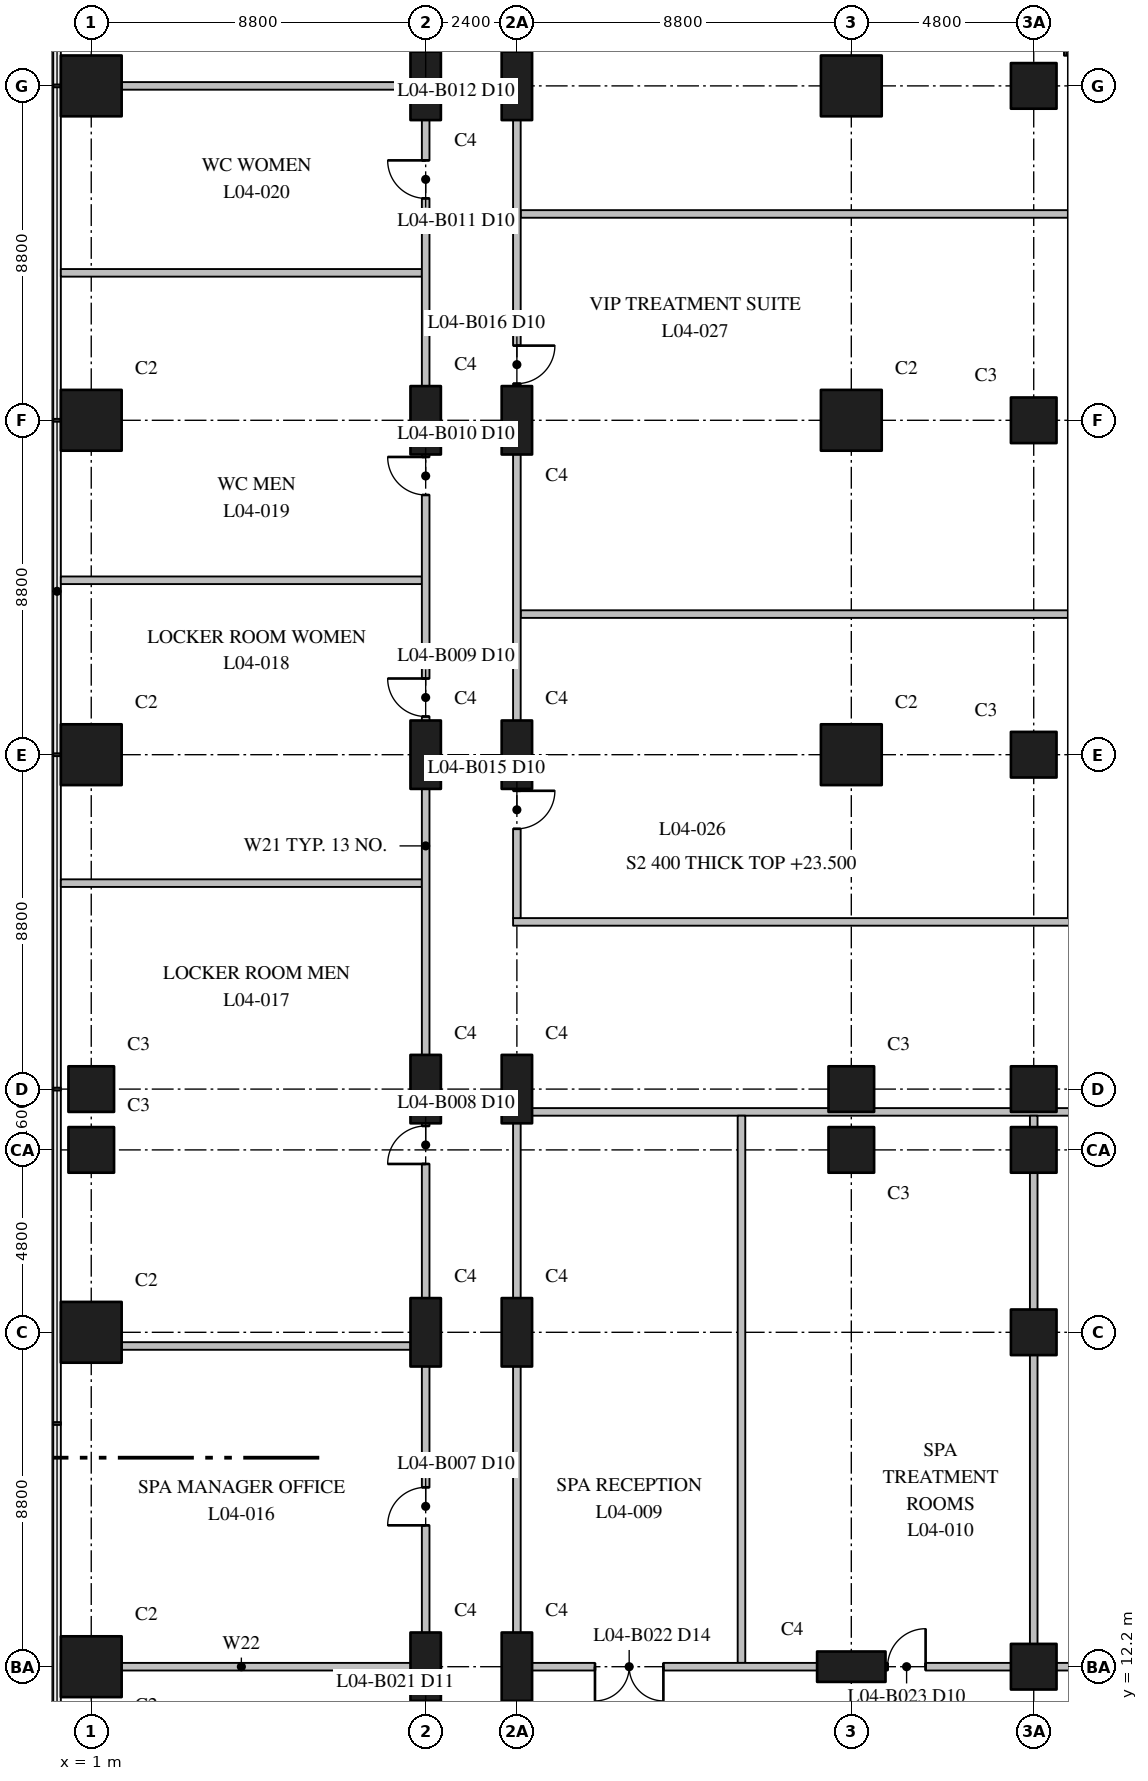
"""IFC4 building model, lengths in metres.
Left out: names, types, materials, properties, quantities, classifications, styles, units other than length and angle.
Written with IfcOpenShell. Run it as: python <this file> out.ifc"""

import sys

from ifc_helpers import new_model, si_unit, direction, frame, frame_2d, origin, origin_2d, place, context, subcontext, project, spatial, rectangle, extrude, element, fill, save


model = new_model("IFC4")
c1 = context("Model", 3, precision=1e-05, world=origin(), true_north=direction((0.0, 1.0)))
c2 = subcontext(c1, "Body", "Model", "MODEL_VIEW")
j1 = project(units=[si_unit("LENGTHUNIT", "METRE"), si_unit("PLANEANGLEUNIT", "RADIAN")], contexts=[c1])
p1 = place(None, origin())
s1 = spatial("IfcSite", under=j1, at=p1, CompositionType="ELEMENT")
p2 = place(p1, origin())
s2 = spatial("IfcBuilding", under=s1, at=p2, CompositionType="ELEMENT")
p3 = place(p2, frame((0.0, 0.0, 23.5)))
s3 = spatial("IfcBuildingStorey", under=s2, at=p3, CompositionType="ELEMENT", Elevation=23.5)
for number, where, z_axis, x_axis in (
    (1, (1.0, 12.2, 0.0), (0.0, 0.0, 1.0), (1.0, 0.0, 0.0)),
    (2, (1.0, 21.0, 0.0), (0.0, 0.0, 1.0), (1.0, 0.0, 0.0)),
):
    element("IfcColumn", number, at=place(p3, frame(where, z_axis=z_axis, x_axis=x_axis)), inside=s3, PredefinedType="COLUMN", context=c2, shape_type="SweptSolid", body=[
        extrude(rectangle(XDim=1.6, YDim=1.6, at=origin_2d()), origin(), (0.0, 0.0, 1.0), 5.5),
    ])
for number, where, z_axis, x_axis in (
    (3, (1.0, 25.8, 0.0), (0.0, 0.0, 1.0), (1.0, 0.0, 0.0)),
    (4, (1.0, 27.4, 0.0), (0.0, 0.0, 1.0), (1.0, 0.0, 0.0)),
):
    element("IfcColumn", number, at=place(p3, frame(where, z_axis=z_axis, x_axis=x_axis)), inside=s3, PredefinedType="COLUMN", context=c2, shape_type="SweptSolid", body=[
        extrude(rectangle(XDim=1.2, YDim=1.2, at=origin_2d()), origin(), (0.0, 0.0, 1.0), 5.5),
    ])
for number, where, z_axis, x_axis in (
    (5, (1.0, 36.2, 0.0), (0.0, 0.0, 1.0), (1.0, 0.0, 0.0)),
    (6, (1.0, 45.0, 0.0), (0.0, 0.0, 1.0), (1.0, 0.0, 0.0)),
    (7, (1.0, 53.8, 0.0), (0.0, 0.0, 1.0), (1.0, 0.0, 0.0)),
):
    element("IfcColumn", number, at=place(p3, frame(where, z_axis=z_axis, x_axis=x_axis)), inside=s3, PredefinedType="COLUMN", context=c2, shape_type="SweptSolid", body=[
        extrude(rectangle(XDim=1.6, YDim=1.6, at=origin_2d()), origin(), (0.0, 0.0, 1.0), 5.5),
    ])
for number, where, z_axis, x_axis in (
    (8, (9.8, 12.2, 0.0), (0.0, 0.0, 1.0), (0.0, 1.0, 0.0)),
    (9, (9.8, 21.0, 0.0), (0.0, 0.0, 1.0), (0.0, 1.0, 0.0)),
    (10, (9.8, 27.4, 0.0), (0.0, 0.0, 1.0), (0.0, 1.0, 0.0)),
    (11, (9.8, 36.2, 0.0), (0.0, 0.0, 1.0), (0.0, 1.0, 0.0)),
    (12, (9.8, 45.0, 0.0), (0.0, 0.0, 1.0), (0.0, 1.0, 0.0)),
    (13, (9.8, 53.8, 0.0), (0.0, 0.0, 1.0), (0.0, 1.0, 0.0)),
    (14, (12.2, 12.2, 0.0), (0.0, 0.0, 1.0), (0.0, 1.0, 0.0)),
    (15, (12.2, 21.0, 0.0), (0.0, 0.0, 1.0), (0.0, 1.0, 0.0)),
    (16, (12.2, 27.4, 0.0), (0.0, 0.0, 1.0), (0.0, 1.0, 0.0)),
    (17, (12.2, 36.2, 0.0), (0.0, 0.0, 1.0), (0.0, 1.0, 0.0)),
    (18, (12.2, 45.0, 0.0), (0.0, 0.0, 1.0), (0.0, 1.0, 0.0)),
    (19, (12.2, 53.8, 0.0), (0.0, 0.0, 1.0), (0.0, 1.0, 0.0)),
    (20, (21.0, 12.2, 0.0), (0.0, 0.0, 1.0), (1.0, 0.0, 0.0)),
):
    element("IfcColumn", number, at=place(p3, frame(where, z_axis=z_axis, x_axis=x_axis)), inside=s3, PredefinedType="COLUMN", context=c2, shape_type="SweptSolid", body=[
        extrude(rectangle(XDim=1.8, YDim=0.8, at=origin_2d()), origin(), (0.0, 0.0, 1.0), 5.5),
    ])
for number, where, z_axis, x_axis in (
    (21, (21.0, 25.8, 0.0), (0.0, 0.0, 1.0), (1.0, 0.0, 0.0)),
    (22, (21.0, 27.4, 0.0), (0.0, 0.0, 1.0), (1.0, 0.0, 0.0)),
):
    element("IfcColumn", number, at=place(p3, frame(where, z_axis=z_axis, x_axis=x_axis)), inside=s3, PredefinedType="COLUMN", context=c2, shape_type="SweptSolid", body=[
        extrude(rectangle(XDim=1.2, YDim=1.2, at=origin_2d()), origin(), (0.0, 0.0, 1.0), 5.5),
    ])
for number, where, z_axis, x_axis in (
    (23, (21.0, 36.2, 0.0), (0.0, 0.0, 1.0), (1.0, 0.0, 0.0)),
    (24, (21.0, 45.0, 0.0), (0.0, 0.0, 1.0), (1.0, 0.0, 0.0)),
    (25, (21.0, 53.8, 0.0), (0.0, 0.0, 1.0), (1.0, 0.0, 0.0)),
):
    element("IfcColumn", number, at=place(p3, frame(where, z_axis=z_axis, x_axis=x_axis)), inside=s3, PredefinedType="COLUMN", context=c2, shape_type="SweptSolid", body=[
        extrude(rectangle(XDim=1.6, YDim=1.6, at=origin_2d()), origin(), (0.0, 0.0, 1.0), 5.5),
    ])
for number, where, z_axis, x_axis in (
    (26, (25.8, 12.2, 0.0), (0.0, 0.0, 1.0), (1.0, 0.0, 0.0)),
    (27, (25.8, 21.0, 0.0), (0.0, 0.0, 1.0), (1.0, 0.0, 0.0)),
    (28, (25.8, 25.8, 0.0), (0.0, 0.0, 1.0), (1.0, 0.0, 0.0)),
    (29, (25.8, 27.4, 0.0), (0.0, 0.0, 1.0), (1.0, 0.0, 0.0)),
    (30, (25.8, 36.2, 0.0), (0.0, 0.0, 1.0), (1.0, 0.0, 0.0)),
    (31, (25.8, 45.0, 0.0), (0.0, 0.0, 1.0), (1.0, 0.0, 0.0)),
    (32, (25.8, 53.8, 0.0), (0.0, 0.0, 1.0), (1.0, 0.0, 0.0)),
):
    element("IfcColumn", number, at=place(p3, frame(where, z_axis=z_axis, x_axis=x_axis)), inside=s3, PredefinedType="COLUMN", context=c2, shape_type="SweptSolid", body=[
        extrude(rectangle(XDim=1.2, YDim=1.2, at=origin_2d()), origin(), (0.0, 0.0, 1.0), 5.5),
    ])
p4 = place(p3, frame((0.2, 12.2, 0.0), z_axis=(0.0, 0.0, 1.0), x_axis=(1.0, 0.0, 0.0)))
e33 = element("IfcWall", 33, at=p4, inside=s3, PredefinedType="PARTITIONING", context=c2, shape_type="SweptSolid", body=[
    extrude(rectangle(XDim=9.5, YDim=0.2, at=frame_2d((4.75, 0.0))), origin(), (0.0, 0.0, 1.0), 5.1),
])
p5 = place(p3, frame((12.1, 12.2, 0.0), z_axis=(0.0, 0.0, 1.0), x_axis=(1.0, 0.0, 0.0)))
e34 = element("IfcWall", 34, at=p5, inside=s3, PredefinedType="PARTITIONING", context=c2, shape_type="SweptSolid", body=[
    extrude(rectangle(XDim=18.9, YDim=0.2, at=frame_2d((9.45, 0.0))), origin(), (0.0, 0.0, 1.0), 5.1),
])
p6 = place(p5, frame((2.155, 0.0, 0.0)))
e35 = element("IfcOpeningElement", 35, at=p6, cuts=e34, PredefinedType="OPENING", context=c2, shape_type="SweptSolid", body=[
    extrude(rectangle(XDim=1.8, YDim=2.4, at=frame_2d((0.9, 1.2))), frame((0.0, 0.11, 0.0), z_axis=(0.0, -1.0, 0.0), x_axis=(1.0, 0.0, 0.0)), (0.0, 0.0, 1.0), 0.22),
])
p7 = place(p5, frame((9.855, 0.0, 0.0)))
e36 = element("IfcOpeningElement", 36, at=p7, cuts=e34, PredefinedType="OPENING", context=c2, shape_type="SweptSolid", body=[
    extrude(rectangle(XDim=1.0, YDim=2.1, at=frame_2d((0.5, 1.05))), frame((0.0, 0.11, 0.0), z_axis=(0.0, -1.0, 0.0), x_axis=(1.0, 0.0, 0.0)), (0.0, 0.0, 1.0), 0.22),
])
p8 = place(p3, frame((12.1, 26.8, 0.0), z_axis=(0.0, 0.0, 1.0), x_axis=(1.0, 0.0, 0.0)))
e37 = element("IfcWall", 37, at=p8, inside=s3, PredefinedType="PARTITIONING", context=c2, shape_type="SweptSolid", body=[
    extrude(rectangle(XDim=51.3, YDim=0.2, at=frame_2d((25.65, 0.0))), origin(), (0.0, 0.0, 1.0), 5.1),
])
p9 = place(p8, frame((18.4, 0.0, 0.0)))
e38 = element("IfcOpeningElement", 38, at=p9, cuts=e37, PredefinedType="OPENING", context=c2, shape_type="SweptSolid", body=[
    extrude(rectangle(XDim=1.0, YDim=2.1, at=frame_2d((0.5, 1.05))), frame((0.0, 0.11, 0.0), z_axis=(0.0, -1.0, 0.0), x_axis=(1.0, 0.0, 0.0)), (0.0, 0.0, 1.0), 0.22),
])
p10 = place(p8, frame((45.2, 0.0, 0.0)))
e39 = element("IfcOpeningElement", 39, at=p10, cuts=e37, PredefinedType="OPENING", context=c2, shape_type="SweptSolid", body=[
    extrude(rectangle(XDim=1.8, YDim=2.4, at=frame_2d((0.9, 1.2))), frame((0.0, 0.11, 0.0), z_axis=(0.0, -1.0, 0.0), x_axis=(1.0, 0.0, 0.0)), (0.0, 0.0, 1.0), 0.22),
])
p11 = place(p3, frame((12.1, 31.8, 0.0), z_axis=(0.0, 0.0, 1.0), x_axis=(1.0, 0.0, 0.0)))
e40 = element("IfcWall", 40, at=p11, inside=s3, PredefinedType="PARTITIONING", context=c2, shape_type="SweptSolid", body=[
    extrude(rectangle(XDim=20.2, YDim=0.2, at=frame_2d((10.1, 0.0))), origin(), (0.0, 0.0, 1.0), 5.1),
])
for number, where, z_axis, x_axis in (
    (41, (0.2, 20.64, 0.0), (0.0, 0.0, 1.0), (1.0, 0.0, 0.0)),
    (42, (0.2, 32.82, 0.0), (0.0, 0.0, 1.0), (1.0, 0.0, 0.0)),
    (43, (0.2, 40.79, 0.0), (0.0, 0.0, 1.0), (1.0, 0.0, 0.0)),
    (44, (0.2, 48.88, 0.0), (0.0, 0.0, 1.0), (1.0, 0.0, 0.0)),
    (45, (0.2, 53.8, 0.0), (0.0, 0.0, 1.0), (1.0, 0.0, 0.0)),
):
    element("IfcWall", number, at=place(p3, frame(where, z_axis=z_axis, x_axis=x_axis)), inside=s3, PredefinedType="PARTITIONING", context=c2, shape_type="SweptSolid", body=[
        extrude(rectangle(XDim=9.5, YDim=0.2, at=frame_2d((4.75, 0.0))), origin(), (0.0, 0.0, 1.0), 5.1),
    ])
for number, where, z_axis, x_axis in (
    (46, (12.3, 39.9, 0.0), (0.0, 0.0, 1.0), (1.0, 0.0, 0.0)),
    (47, (12.3, 50.43, 0.0), (0.0, 0.0, 1.0), (1.0, 0.0, 0.0)),
):
    element("IfcWall", number, at=place(p3, frame(where, z_axis=z_axis, x_axis=x_axis)), inside=s3, PredefinedType="PARTITIONING", context=c2, shape_type="SweptSolid", body=[
        extrude(rectangle(XDim=14.4, YDim=0.2, at=frame_2d((7.2, 0.0))), origin(), (0.0, 0.0, 1.0), 5.1),
    ])
p12 = place(p3, frame((9.8, 9.8, 0.0), z_axis=(0.0, 0.0, 1.0), x_axis=(0.0, 1.0, 0.0)))
e48 = element("IfcWall", 48, at=p12, inside=s3, PredefinedType="PARTITIONING", context=c2, shape_type="SweptSolid", body=[
    extrude(rectangle(XDim=48.0, YDim=0.2, at=frame_2d((24.0, 0.0))), origin(), (0.0, 0.0, 1.0), 5.1),
])
p13 = place(p12, frame((6.12, 0.0, 0.0)))
e49 = element("IfcOpeningElement", 49, at=p13, cuts=e48, PredefinedType="OPENING", context=c2, shape_type="SweptSolid", body=[
    extrude(rectangle(XDim=1.0, YDim=2.1, at=frame_2d((0.5, 1.05))), frame((0.0, 0.11, 0.0), z_axis=(0.0, -1.0, 0.0), x_axis=(1.0, 0.0, 0.0)), (0.0, 0.0, 1.0), 0.22),
])
p14 = place(p12, frame((15.63, 0.0, 0.0)))
e50 = element("IfcOpeningElement", 50, at=p14, cuts=e48, PredefinedType="OPENING", context=c2, shape_type="SweptSolid", body=[
    extrude(rectangle(XDim=1.0, YDim=2.1, at=frame_2d((0.5, 1.05))), frame((0.0, 0.11, 0.0), z_axis=(0.0, -1.0, 0.0), x_axis=(1.0, 0.0, 0.0)), (0.0, 0.0, 1.0), 0.22),
])
p15 = place(p12, frame((27.405, 0.0, 0.0)))
e51 = element("IfcOpeningElement", 51, at=p15, cuts=e48, PredefinedType="OPENING", context=c2, shape_type="SweptSolid", body=[
    extrude(rectangle(XDim=1.0, YDim=2.1, at=frame_2d((0.5, 1.05))), frame((0.0, 0.11, 0.0), z_axis=(0.0, -1.0, 0.0), x_axis=(1.0, 0.0, 0.0)), (0.0, 0.0, 1.0), 0.22),
])
p16 = place(p12, frame((33.235, 0.0, 0.0)))
e52 = element("IfcOpeningElement", 52, at=p16, cuts=e48, PredefinedType="OPENING", context=c2, shape_type="SweptSolid", body=[
    extrude(rectangle(XDim=1.0, YDim=2.1, at=frame_2d((0.5, 1.05))), frame((0.0, 0.11, 0.0), z_axis=(0.0, -1.0, 0.0), x_axis=(1.0, 0.0, 0.0)), (0.0, 0.0, 1.0), 0.22),
])
p17 = place(p12, frame((41.04, 0.0, 0.0)))
e53 = element("IfcOpeningElement", 53, at=p17, cuts=e48, PredefinedType="OPENING", context=c2, shape_type="SweptSolid", body=[
    extrude(rectangle(XDim=1.0, YDim=2.1, at=frame_2d((0.5, 1.05))), frame((0.0, 0.11, 0.0), z_axis=(0.0, -1.0, 0.0), x_axis=(1.0, 0.0, 0.0)), (0.0, 0.0, 1.0), 0.22),
])
p18 = place(p12, frame((44.967, 0.0, 0.0)))
e54 = element("IfcOpeningElement", 54, at=p18, cuts=e48, PredefinedType="OPENING", context=c2, shape_type="SweptSolid", body=[
    extrude(rectangle(XDim=1.0, YDim=2.1, at=frame_2d((0.5, 1.05))), frame((0.0, 0.11, 0.0), z_axis=(0.0, -1.0, 0.0), x_axis=(1.0, 0.0, 0.0)), (0.0, 0.0, 1.0), 0.22),
])
p19 = place(p12, frame((0.4, 0.0, 0.0)))
e55 = element("IfcOpeningElement", 55, at=p19, cuts=e48, PredefinedType="OPENING", context=c2, shape_type="SweptSolid", body=[
    extrude(rectangle(XDim=1.0, YDim=2.1, at=frame_2d((0.5, 1.05))), frame((0.0, 0.11, 0.0), z_axis=(0.0, -1.0, 0.0), x_axis=(1.0, 0.0, 0.0)), (0.0, 0.0, 1.0), 0.22),
])
p20 = place(p3, frame((12.2, 12.3, 0.0), z_axis=(0.0, 0.0, 1.0), x_axis=(0.0, 1.0, 0.0)))
e56 = element("IfcWall", 56, at=p20, inside=s3, PredefinedType="PARTITIONING", context=c2, shape_type="SweptSolid", body=[
    extrude(rectangle(XDim=14.4, YDim=0.2, at=frame_2d((7.2, 0.0))), origin(), (0.0, 0.0, 1.0), 5.1),
])
p21 = place(p3, frame((12.2, 31.9, 0.0), z_axis=(0.0, 0.0, 1.0), x_axis=(0.0, 1.0, 0.0)))
e57 = element("IfcWall", 57, at=p21, inside=s3, PredefinedType="PARTITIONING", context=c2, shape_type="SweptSolid", body=[
    extrude(rectangle(XDim=46.3, YDim=0.2, at=frame_2d((23.15, 0.0))), origin(), (0.0, 0.0, 1.0), 5.1),
])
p22 = place(p21, frame((2.35, 0.0, 0.0)))
e58 = element("IfcOpeningElement", 58, at=p22, cuts=e57, PredefinedType="OPENING", context=c2, shape_type="SweptSolid", body=[
    extrude(rectangle(XDim=1.0, YDim=2.1, at=frame_2d((0.5, 1.05))), frame((0.0, 0.11, 0.0), z_axis=(0.0, -1.0, 0.0), x_axis=(1.0, 0.0, 0.0)), (0.0, 0.0, 1.0), 0.22),
])
p23 = place(p21, frame((14.065, 0.0, 0.0)))
e59 = element("IfcOpeningElement", 59, at=p23, cuts=e57, PredefinedType="OPENING", context=c2, shape_type="SweptSolid", body=[
    extrude(rectangle(XDim=1.0, YDim=2.1, at=frame_2d((0.5, 1.05))), frame((0.0, 0.11, 0.0), z_axis=(0.0, -1.0, 0.0), x_axis=(1.0, 0.0, 0.0)), (0.0, 0.0, 1.0), 0.22),
])
p24 = place(p21, frame((22.84, 0.0, 0.0)))
e60 = element("IfcOpeningElement", 60, at=p24, cuts=e57, PredefinedType="OPENING", context=c2, shape_type="SweptSolid", body=[
    extrude(rectangle(XDim=1.8, YDim=2.4, at=frame_2d((0.9, 1.2))), frame((0.0, 0.11, 0.0), z_axis=(0.0, -1.0, 0.0), x_axis=(1.0, 0.0, 0.0)), (0.0, 0.0, 1.0), 0.22),
])
p25 = place(p21, frame((27.94, 0.0, 0.0)))
e61 = element("IfcOpeningElement", 61, at=p25, cuts=e57, PredefinedType="OPENING", context=c2, shape_type="SweptSolid", body=[
    extrude(rectangle(XDim=1.8, YDim=2.4, at=frame_2d((0.9, 1.2))), frame((0.0, 0.11, 0.0), z_axis=(0.0, -1.0, 0.0), x_axis=(1.0, 0.0, 0.0)), (0.0, 0.0, 1.0), 0.22),
])
p26 = place(p21, frame((37.565, 0.0, 0.0)))
e62 = element("IfcOpeningElement", 62, at=p26, cuts=e57, PredefinedType="OPENING", context=c2, shape_type="SweptSolid", body=[
    extrude(rectangle(XDim=1.0, YDim=2.1, at=frame_2d((0.5, 1.05))), frame((0.0, 0.11, 0.0), z_axis=(0.0, -1.0, 0.0), x_axis=(1.0, 0.0, 0.0)), (0.0, 0.0, 1.0), 0.22),
])
p27 = place(p21, frame((42.85, 0.0, 0.0)))
e63 = element("IfcOpeningElement", 63, at=p27, cuts=e57, PredefinedType="OPENING", context=c2, shape_type="SweptSolid", body=[
    extrude(rectangle(XDim=1.8, YDim=2.1, at=frame_2d((0.9, 1.05))), frame((0.0, 0.11, 0.0), z_axis=(0.0, -1.0, 0.0), x_axis=(1.0, 0.0, 0.0)), (0.0, 0.0, 1.0), 0.22),
])
for number, where, z_axis, x_axis in (
    (64, (18.11, 12.3, 0.0), (0.0, 0.0, 1.0), (0.0, 1.0, 0.0)),
    (65, (25.8, 12.3, 0.0), (0.0, 0.0, 1.0), (0.0, 1.0, 0.0)),
):
    element("IfcWall", number, at=place(p3, frame(where, z_axis=z_axis, x_axis=x_axis)), inside=s3, PredefinedType="PARTITIONING", context=c2, shape_type="SweptSolid", body=[
        extrude(rectangle(XDim=14.4, YDim=0.2, at=frame_2d((7.2, 0.0))), origin(), (0.0, 0.0, 1.0), 5.1),
    ])
p28 = place(p13, origin())
e66 = element("IfcDoor", 66, at=p28, inside=s3, OperationType="SINGLE_SWING_LEFT", PredefinedType="DOOR", context=c2, shape_type="SweptSolid", body=[
    extrude(rectangle(XDim=1.0, YDim=2.1, at=frame_2d((0.5, 1.05))), frame((0.0, 0.025, 0.0), z_axis=(0.0, -1.0, 0.0), x_axis=(1.0, 0.0, 0.0)), (0.0, 0.0, 1.0), 0.05),
])
fill(e49, e66)
p29 = place(p14, origin())
e67 = element("IfcDoor", 67, at=p29, inside=s3, OperationType="SINGLE_SWING_LEFT", PredefinedType="DOOR", context=c2, shape_type="SweptSolid", body=[
    extrude(rectangle(XDim=1.0, YDim=2.1, at=frame_2d((0.5, 1.05))), frame((0.0, 0.025, 0.0), z_axis=(0.0, -1.0, 0.0), x_axis=(1.0, 0.0, 0.0)), (0.0, 0.0, 1.0), 0.05),
])
fill(e50, e67)
p30 = place(p15, origin())
e68 = element("IfcDoor", 68, at=p30, inside=s3, OperationType="SINGLE_SWING_RIGHT", PredefinedType="DOOR", context=c2, shape_type="SweptSolid", body=[
    extrude(rectangle(XDim=1.0, YDim=2.1, at=frame_2d((0.5, 1.05))), frame((0.0, 0.025, 0.0), z_axis=(0.0, -1.0, 0.0), x_axis=(1.0, 0.0, 0.0)), (0.0, 0.0, 1.0), 0.05),
])
fill(e51, e68)
p31 = place(p16, origin())
e69 = element("IfcDoor", 69, at=p31, inside=s3, OperationType="SINGLE_SWING_RIGHT", PredefinedType="DOOR", context=c2, shape_type="SweptSolid", body=[
    extrude(rectangle(XDim=1.0, YDim=2.1, at=frame_2d((0.5, 1.05))), frame((0.0, 0.025, 0.0), z_axis=(0.0, -1.0, 0.0), x_axis=(1.0, 0.0, 0.0)), (0.0, 0.0, 1.0), 0.05),
])
fill(e52, e69)
p32 = place(p17, origin())
e70 = element("IfcDoor", 70, at=p32, inside=s3, OperationType="SINGLE_SWING_RIGHT", PredefinedType="DOOR", context=c2, shape_type="SweptSolid", body=[
    extrude(rectangle(XDim=1.0, YDim=2.1, at=frame_2d((0.5, 1.05))), frame((0.0, 0.025, 0.0), z_axis=(0.0, -1.0, 0.0), x_axis=(1.0, 0.0, 0.0)), (0.0, 0.0, 1.0), 0.05),
])
fill(e53, e70)
p33 = place(p22, frame((1.0, 0.0, 0.0), z_axis=(0.0, 0.0, 1.0), x_axis=(-1.0, 0.0, 0.0)))
e71 = element("IfcDoor", 71, at=p33, inside=s3, OperationType="SINGLE_SWING_RIGHT", PredefinedType="DOOR", context=c2, shape_type="SweptSolid", body=[
    extrude(rectangle(XDim=1.0, YDim=2.1, at=frame_2d((0.5, 1.05))), frame((0.0, 0.025, 0.0), z_axis=(0.0, -1.0, 0.0), x_axis=(1.0, 0.0, 0.0)), (0.0, 0.0, 1.0), 0.05),
])
fill(e58, e71)
p34 = place(p23, frame((1.0, 0.0, 0.0), z_axis=(0.0, 0.0, 1.0), x_axis=(-1.0, 0.0, 0.0)))
e72 = element("IfcDoor", 72, at=p34, inside=s3, OperationType="SINGLE_SWING_RIGHT", PredefinedType="DOOR", context=c2, shape_type="SweptSolid", body=[
    extrude(rectangle(XDim=1.0, YDim=2.1, at=frame_2d((0.5, 1.05))), frame((0.0, 0.025, 0.0), z_axis=(0.0, -1.0, 0.0), x_axis=(1.0, 0.0, 0.0)), (0.0, 0.0, 1.0), 0.05),
])
fill(e59, e72)
p35 = place(p6, frame((1.8, 0.0, 0.0), z_axis=(0.0, 0.0, 1.0), x_axis=(-1.0, 0.0, 0.0)))
e73 = element("IfcDoor", 73, at=p35, inside=s3, OperationType="DOUBLE_DOOR_SINGLE_SWING", PredefinedType="DOOR", context=c2, shape_type="SweptSolid", body=[
    extrude(rectangle(XDim=1.8, YDim=2.4, at=frame_2d((0.9, 1.2))), frame((0.0, 0.025, 0.0), z_axis=(0.0, -1.0, 0.0), x_axis=(1.0, 0.0, 0.0)), (0.0, 0.0, 1.0), 0.05),
])
fill(e35, e73)
p36 = place(p7, origin())
e74 = element("IfcDoor", 74, at=p36, inside=s3, OperationType="SINGLE_SWING_RIGHT", PredefinedType="DOOR", context=c2, shape_type="SweptSolid", body=[
    extrude(rectangle(XDim=1.0, YDim=2.1, at=frame_2d((0.5, 1.05))), frame((0.0, 0.025, 0.0), z_axis=(0.0, -1.0, 0.0), x_axis=(1.0, 0.0, 0.0)), (0.0, 0.0, 1.0), 0.05),
])
fill(e36, e74)
save(model, sys.argv[1])
